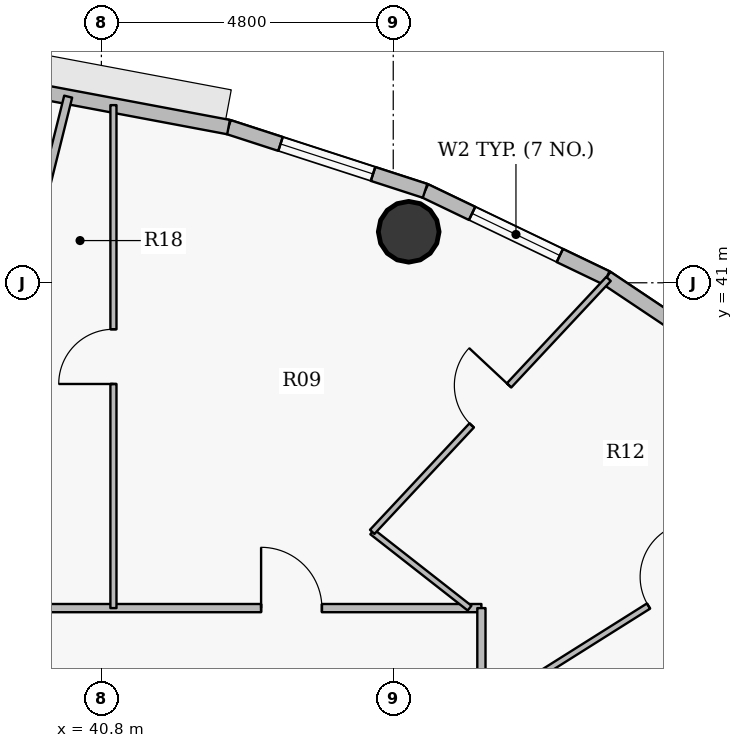
"""IFC4 building model, lengths in metres.
Left out: names, types, materials, properties, quantities, classifications, styles, units other than length and angle.
Written with IfcOpenShell. Run it as: python <this file> out.ifc"""

import sys

from ifc_helpers import new_model, si_unit, direction, frame, frame_2d, origin, origin_2d, place, context, subcontext, project, spatial, rectangle, hollow_circle, extrude, source, transform, mapped, element, fill, save


model = new_model("IFC4")
c1 = context("Model", 3, precision=1e-05, world=origin(), true_north=direction((0.0, 1.0)))
c2 = subcontext(c1, "Body", "Model", "MODEL_VIEW")
j1 = project(units=[si_unit("LENGTHUNIT", "METRE"), si_unit("PLANEANGLEUNIT", "RADIAN")], contexts=[c1])
p1 = place(None, origin())
s1 = spatial("IfcSite", under=j1, at=p1, CompositionType="ELEMENT")
p2 = place(p1, origin())
s2 = spatial("IfcBuilding", under=s1, at=p2, CompositionType="ELEMENT")
p3 = place(p2, frame((0.0, 0.0, 299.25)))
s3 = spatial("IfcBuildingStorey", under=s2, at=p3, CompositionType="ELEMENT", Elevation=299.25)
p4 = place(p3, frame((45.854, 41.839, 0.0), z_axis=(0.0, 0.0, 1.0), x_axis=(1.0, 0.0, 0.0)))
e1 = element("IfcColumn", 1, at=p4, inside=s3, PredefinedType="COLUMN", context=c2, shape_type="SweptSolid", body=[
    extrude(hollow_circle(Radius=0.5, WallThickness=0.032, at=origin_2d()), origin(), (0.0, 0.0, 1.0), 3.75),
])
p5 = place(p3, frame((49.104, 41.082, 0.0), z_axis=(0.0, 0.0, 1.0), x_axis=(0.831250592635, -0.55589787933, 0.0)))
e2 = element("IfcWall", 2, at=p5, inside=s3, PredefinedType="SOLIDWALL", context=c2, shape_type="SweptSolid", body=[
    extrude(rectangle(XDim=3.197, YDim=0.24, at=frame_2d((1.599, 0.0))), origin(), (0.0, 0.0, 1.0), 3.5),
])
p6 = place(p3, frame((46.123, 42.512, 0.0), z_axis=(0.0, 0.0, 1.0), x_axis=(0.901573741254, -0.43262546051, 0.0)))
e3 = element("IfcWall", 3, at=p6, inside=s3, PredefinedType="SOLIDWALL", context=c2, shape_type="SweptSolid", body=[
    extrude(rectangle(XDim=3.307, YDim=0.24, at=frame_2d((1.653, 0.0))), origin(), (0.0, 0.0, 1.0), 3.5),
])
p7 = place(p6, frame((0.858, 0.0, 0.9)))
e4 = element("IfcOpeningElement", 4, at=p7, cuts=e3, PredefinedType="OPENING", context=c2, shape_type="SweptSolid", body=[
    extrude(rectangle(XDim=1.6, YDim=1.75, at=origin_2d()), frame((0.8, 0.13, 0.875), z_axis=(0.0, -1.0, 0.0), x_axis=(1.0, 0.0, 0.0)), (0.0, 0.0, 1.0), 0.26),
])
p8 = place(p3, frame((42.891, 43.56, 0.0), z_axis=(0.0, 0.0, 1.0), x_axis=(0.95123136723, -0.308478339592, 0.0)))
e5 = element("IfcWall", 5, at=p8, inside=s3, PredefinedType="SOLIDWALL", context=c2, shape_type="SweptSolid", body=[
    extrude(rectangle(XDim=3.398, YDim=0.24, at=frame_2d((1.699, 0.0))), origin(), (0.0, 0.0, 1.0), 3.5),
])
p9 = place(p8, frame((0.899, 0.0, 0.9)))
e6 = element("IfcOpeningElement", 6, at=p9, cuts=e5, PredefinedType="OPENING", context=c2, shape_type="SweptSolid", body=[
    extrude(rectangle(XDim=1.6, YDim=1.75, at=origin_2d()), frame((0.8, 0.13, 0.875), z_axis=(0.0, -1.0, 0.0), x_axis=(1.0, 0.0, 0.0)), (0.0, 0.0, 1.0), 0.26),
])
p10 = place(p3, frame((39.489, 44.2, 0.0), z_axis=(0.0, 0.0, 1.0), x_axis=(0.982782655757, -0.184765395959, 0.0)))
e7 = element("IfcWall", 7, at=p10, inside=s3, PredefinedType="SOLIDWALL", context=c2, shape_type="SweptSolid", body=[
    extrude(rectangle(XDim=3.462, YDim=0.24, at=frame_2d((1.731, 0.0))), origin(), (0.0, 0.0, 1.0), 3.5),
])
p11 = place(p3, frame((36.95, 35.65, 0.0), z_axis=(0.0, 0.0, 1.0), x_axis=(1.0, 0.0, 0.0)))
e8 = element("IfcWall", 8, at=p11, inside=s3, PredefinedType="PARTITIONING", context=c2, shape_type="SweptSolid", body=[
    extrude(rectangle(XDim=10.1, YDim=0.135, at=frame_2d((5.05, 0.0))), origin(), (0.0, 0.0, 1.0), 3.035),
])
p12 = place(p11, frame((6.477, 0.0, 0.0)))
e9 = element("IfcOpeningElement", 9, at=p12, cuts=e8, PredefinedType="OPENING", context=c2, shape_type="SweptSolid", body=[
    extrude(rectangle(XDim=1.0, YDim=2.15, at=origin_2d()), frame((0.5, 0.078, 1.075), z_axis=(0.0, -1.0, 0.0), x_axis=(1.0, 0.0, 0.0)), (0.0, 0.0, 1.0), 0.155),
])
p13 = place(p3, frame((39.9, 42.642, 0.0), z_axis=(0.0, 0.0, 1.0), x_axis=(0.241985841386, 0.970279780563, 0.0)))
e10 = element("IfcWall", 10, at=p13, inside=s3, PredefinedType="PARTITIONING", context=c2, shape_type="SweptSolid", body=[
    extrude(rectangle(XDim=1.463, YDim=0.135, at=frame_2d((0.731, 0.0))), origin(), (0.0, 0.0, 1.0), 2.985),
])
p14 = place(p3, frame((40.998, 35.65, 0.0), z_axis=(0.0, 0.0, 1.0), x_axis=(0.0, 1.0, 0.0)))
e11 = element("IfcWall", 11, at=p14, inside=s3, PredefinedType="PARTITIONING", context=c2, shape_type="SweptSolid", body=[
    extrude(rectangle(XDim=8.271, YDim=0.1, at=frame_2d((4.136, 0.0))), origin(), (0.0, 0.0, 1.0), 2.985),
])
p15 = place(p14, frame((3.686, 0.0, 0.0)))
e12 = element("IfcOpeningElement", 12, at=p15, cuts=e11, PredefinedType="OPENING", context=c2, shape_type="SweptSolid", body=[
    extrude(rectangle(XDim=0.9, YDim=2.1, at=origin_2d()), frame((0.45, 0.06, 1.05), z_axis=(0.0, -1.0, 0.0), x_axis=(1.0, 0.0, 0.0)), (0.0, 0.0, 1.0), 0.12),
])
p16 = place(p3, frame((45.254, 36.904, 0.0), z_axis=(0.0, 0.0, 1.0), x_axis=(0.787350433025, -0.616505714179, 0.0)))
e13 = element("IfcWall", 13, at=p16, inside=s3, PredefinedType="PARTITIONING", context=c2, shape_type="SweptSolid", body=[
    extrude(rectangle(XDim=2.033, YDim=0.1, at=frame_2d((1.017, 0.0))), origin(), (0.0, 0.0, 1.0), 3.5),
])
p17 = place(p3, frame((45.254, 36.904, 0.0), z_axis=(0.0, 0.0, 1.0), x_axis=(0.682727638106, 0.73067295842, 0.0)))
e14 = element("IfcWall", 14, at=p17, inside=s3, PredefinedType="PARTITIONING", context=c2, shape_type="SweptSolid", body=[
    extrude(rectangle(XDim=5.693, YDim=0.1, at=frame_2d((2.846, 0.0))), origin(), (0.0, 0.0, 1.0), 2.985),
])
p18 = place(p17, frame((2.396, 0.0, 0.0)))
e15 = element("IfcOpeningElement", 15, at=p18, cuts=e14, PredefinedType="OPENING", context=c2, shape_type="SweptSolid", body=[
    extrude(rectangle(XDim=0.9, YDim=2.1, at=origin_2d()), frame((0.45, 0.06, 1.05), z_axis=(0.0, -1.0, 0.0), x_axis=(1.0, 0.0, 0.0)), (0.0, 0.0, 1.0), 0.12),
])
p19 = place(p3, frame((47.05, 18.35, 0.0), z_axis=(0.0, 0.0, 1.0), x_axis=(0.0, 1.0, 0.0)))
e16 = element("IfcWall", 16, at=p19, inside=s3, PredefinedType="PARTITIONING", context=c2, shape_type="SweptSolid", body=[
    extrude(rectangle(XDim=17.3, YDim=0.135, at=frame_2d((8.65, 0.0))), origin(), (0.0, 0.0, 1.0), 3.035),
])
p20 = place(p19, frame((6.155, 0.0, 0.0)))
e17 = element("IfcOpeningElement", 17, at=p20, cuts=e16, PredefinedType="OPENING", context=c2, shape_type="SweptSolid", body=[
    extrude(rectangle(XDim=1.0, YDim=2.15, at=origin_2d()), frame((0.5, 0.078, 1.075), z_axis=(0.0, -1.0, 0.0), x_axis=(1.0, 0.0, 0.0)), (0.0, 0.0, 1.0), 0.155),
])
p21 = place(p3, frame((47.05, 33.954, 0.0), z_axis=(0.0, 0.0, 1.0), x_axis=(0.846339777122, 0.532643390704, 0.0)))
e18 = element("IfcWall", 18, at=p21, inside=s3, PredefinedType="PARTITIONING", context=c2, shape_type="SweptSolid", body=[
    extrude(rectangle(XDim=7.395, YDim=0.1, at=frame_2d((3.698, 0.0))), origin(), (0.0, 0.0, 1.0), 2.985),
])
p22 = place(p21, frame((3.248, 0.0, 0.0)))
e19 = element("IfcOpeningElement", 19, at=p22, cuts=e18, PredefinedType="OPENING", context=c2, shape_type="SweptSolid", body=[
    extrude(rectangle(XDim=0.9, YDim=2.1, at=origin_2d()), frame((0.45, 0.06, 1.05), z_axis=(0.0, -1.0, 0.0), x_axis=(1.0, 0.0, 0.0)), (0.0, 0.0, 1.0), 0.12),
])
m1 = source(origin(), c2, "Body", "SweptSolid", [
    extrude(rectangle(XDim=1.6, YDim=1.75, at=origin_2d()), frame((0.8, 0.03, 0.875), z_axis=(0.0, -1.0, 0.0), x_axis=(1.0, 0.0, 0.0)), (0.0, 0.0, 1.0), 0.06),
])
p23 = place(p7, origin())
e20 = element("IfcWindow", 20, at=p23, inside=s3, PartitioningType="DOUBLE_PANEL_VERTICAL", PredefinedType="WINDOW", context=c2, shape_type="MappedRepresentation", body=[
    mapped(m1, transform((0.0, 0.0, 0.0), x_axis=(1.0, 0.0, 0.0), y_axis=(0.0, 1.0, 0.0), z_axis=(0.0, 0.0, 1.0), scale=1.0)),
])
fill(e4, e20)
p24 = place(p9, origin())
e21 = element("IfcWindow", 21, at=p24, inside=s3, PartitioningType="DOUBLE_PANEL_VERTICAL", PredefinedType="WINDOW", context=c2, shape_type="MappedRepresentation", body=[
    mapped(m1, transform((0.0, 0.0, 0.0), x_axis=(1.0, 0.0, 0.0), y_axis=(0.0, 1.0, 0.0), z_axis=(0.0, 0.0, 1.0), scale=1.0)),
])
fill(e6, e21)
m2 = source(origin(), c2, "Body", "SweptSolid", [
    extrude(rectangle(XDim=1.0, YDim=2.15, at=origin_2d()), frame((0.5, 0.025, 1.075), z_axis=(0.0, -1.0, 0.0), x_axis=(1.0, 0.0, 0.0)), (0.0, 0.0, 1.0), 0.05),
])
p25 = place(p12, origin())
e22 = element("IfcDoor", 22, at=p25, inside=s3, OperationType="SINGLE_SWING_LEFT", PredefinedType="DOOR", context=c2, shape_type="MappedRepresentation", body=[
    mapped(m2, transform((0.0, 0.0, 0.0), x_axis=(1.0, 0.0, 0.0), y_axis=(0.0, 1.0, 0.0), z_axis=(0.0, 0.0, 1.0), scale=1.0)),
])
fill(e9, e22)
m3 = source(origin(), c2, "Body", "SweptSolid", [
    extrude(rectangle(XDim=0.9, YDim=2.1, at=origin_2d()), frame((0.45, 0.025, 1.05), z_axis=(0.0, -1.0, 0.0), x_axis=(1.0, 0.0, 0.0)), (0.0, 0.0, 1.0), 0.05),
])
p26 = place(p18, origin())
e23 = element("IfcDoor", 23, at=p26, inside=s3, OperationType="SINGLE_SWING_RIGHT", PredefinedType="DOOR", context=c2, shape_type="MappedRepresentation", body=[
    mapped(m3, transform((0.0, 0.0, 0.0), x_axis=(1.0, 0.0, 0.0), y_axis=(0.0, 1.0, 0.0), z_axis=(0.0, 0.0, 1.0), scale=1.0)),
])
fill(e15, e23)
p27 = place(p15, origin())
e24 = element("IfcDoor", 24, at=p27, inside=s3, OperationType="SINGLE_SWING_LEFT", PredefinedType="DOOR", context=c2, shape_type="MappedRepresentation", body=[
    mapped(m3, transform((0.0, 0.0, 0.0), x_axis=(1.0, 0.0, 0.0), y_axis=(0.0, 1.0, 0.0), z_axis=(0.0, 0.0, 1.0), scale=1.0)),
])
fill(e12, e24)
p28 = place(p22, origin())
e25 = element("IfcDoor", 25, at=p28, inside=s3, OperationType="SINGLE_SWING_RIGHT", PredefinedType="DOOR", context=c2, shape_type="MappedRepresentation", body=[
    mapped(m3, transform((0.0, 0.0, 0.0), x_axis=(1.0, 0.0, 0.0), y_axis=(0.0, 1.0, 0.0), z_axis=(0.0, 0.0, 1.0), scale=1.0)),
])
fill(e19, e25)
save(model, sys.argv[1])
